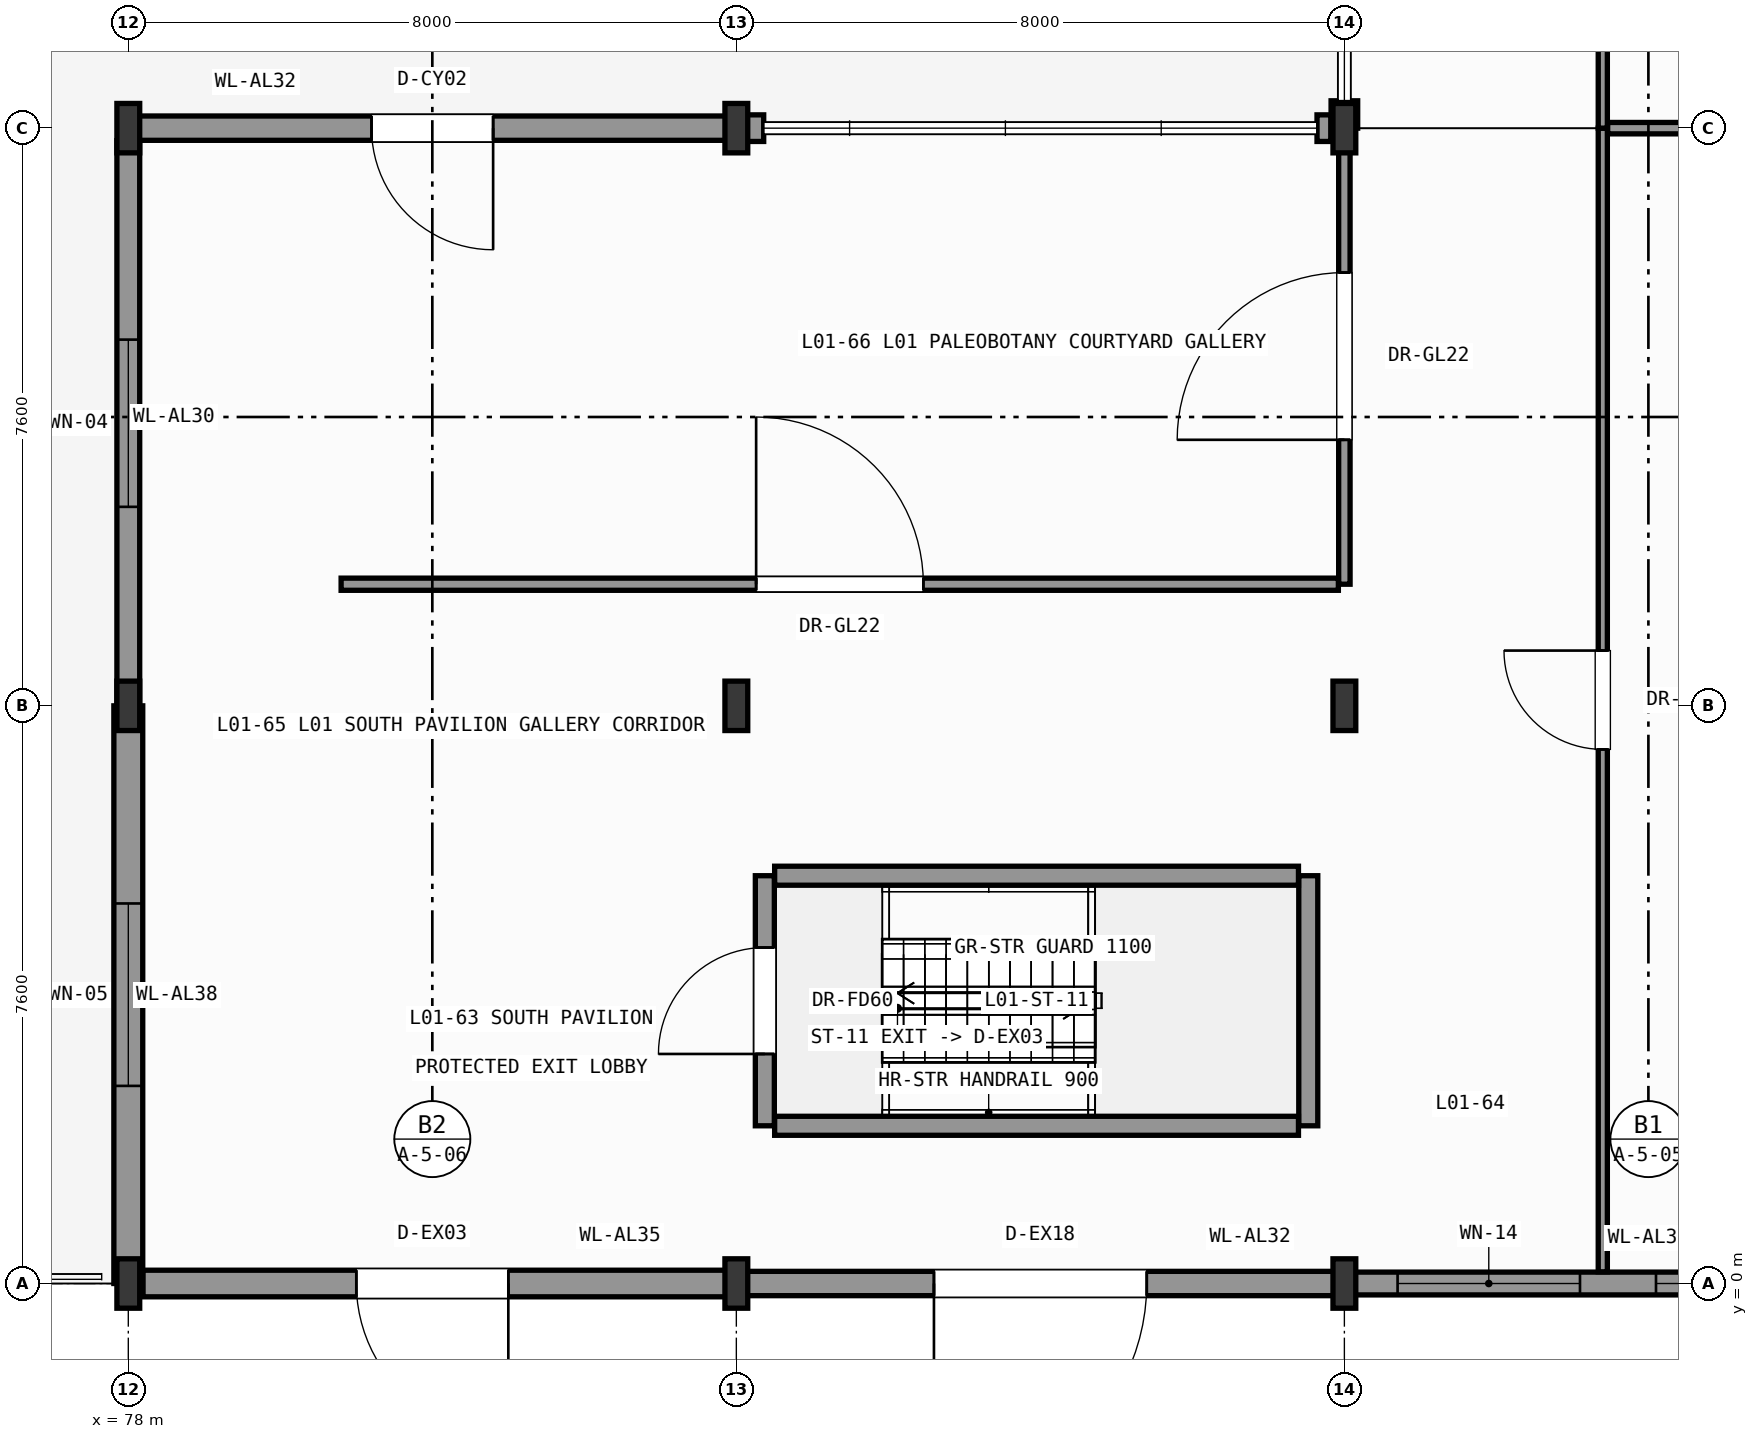
"""IFC4 building model, lengths in metres.
Left out: names, types, materials, properties, quantities, classifications, styles, units other than length and angle.
Written with IfcOpenShell. Run it as: python <this file> out.ifc"""

import sys

from ifc_helpers import new_model, si_unit, direction, frame, frame_2d, origin, origin_2d, place, context, subcontext, project, spatial, rectangle, i_section, extrude, element, fill, save


model = new_model("IFC4")
c1 = context("Model", 3, precision=1e-05, world=origin(), true_north=direction((0.0, 1.0)))
c2 = subcontext(c1, "Body", "Model", "MODEL_VIEW")
j1 = project(units=[si_unit("LENGTHUNIT", "METRE"), si_unit("PLANEANGLEUNIT", "RADIAN")], contexts=[c1])
p1 = place(None, origin())
s1 = spatial("IfcSite", under=j1, at=p1, CompositionType="ELEMENT")
p2 = place(p1, origin())
s2 = spatial("IfcBuilding", under=s1, at=p2, CompositionType="ELEMENT")
p3 = place(p2, origin())
s3 = spatial("IfcBuildingStorey", under=s2, at=p3, CompositionType="ELEMENT", Elevation=0.0)
for number, where, z_axis, x_axis in (
    (1, (78.0, 0.0, 0.0), (0.0, 0.0, 1.0), (1.0, 0.0, 0.0)),
    (2, (78.0, 7.6, 0.0), (0.0, 0.0, 1.0), (1.0, 0.0, 0.0)),
    (3, (78.0, 15.2, 0.0), (0.0, 0.0, 1.0), (1.0, 0.0, 0.0)),
    (4, (86.0, 0.0, 0.0), (0.0, 0.0, 1.0), (1.0, 0.0, 0.0)),
    (5, (86.0, 7.6, 0.0), (0.0, 0.0, 1.0), (1.0, 0.0, 0.0)),
    (6, (86.0, 15.2, 0.0), (0.0, 0.0, 1.0), (1.0, 0.0, 0.0)),
    (7, (94.0, 0.0, 0.0), (0.0, 0.0, 1.0), (1.0, 0.0, 0.0)),
    (8, (94.0, 7.6, 0.0), (0.0, 0.0, 1.0), (1.0, 0.0, 0.0)),
    (9, (94.0, 15.2, 0.0), (0.0, 0.0, 1.0), (1.0, 0.0, 0.0)),
):
    element("IfcColumn", number, at=place(p3, frame(where, z_axis=z_axis, x_axis=x_axis)), inside=s3, PredefinedType="COLUMN", context=c2, shape_type="SweptSolid", body=[
        extrude(i_section(OverallWidth=0.3, OverallDepth=0.65, WebThickness=0.016, FlangeThickness=0.031, FilletRadius=0.027, at=origin_2d()), origin(), (0.0, 0.0, 1.0), 7.8),
    ])
p4 = place(p3, frame((94.0, 15.56, 0.0), z_axis=(0.0, 0.0, 1.0), x_axis=(0.0, -1.0, 0.0)))
e10 = element("IfcWall", 10, at=p4, inside=s3, PredefinedType="SOLIDWALL", context=c2, shape_type="SweptSolid", body=[
    extrude(rectangle(XDim=0.36, YDim=0.35, at=frame_2d((0.18, 0.0))), origin(), (0.0, 0.0, 1.0), 7.025),
])
p5 = place(p3, frame((93.821, 15.2, 0.0), z_axis=(0.0, 0.0, 1.0), x_axis=(-1.0, 0.0, 0.0)))
e11 = element("IfcWall", 11, at=p5, inside=s3, PredefinedType="SOLIDWALL", context=c2, shape_type="SweptSolid", body=[
    extrude(rectangle(XDim=0.181, YDim=0.35, at=frame_2d((0.091, 0.0))), origin(), (0.0, 0.0, 1.0), 7.54),
])
p6 = place(p3, frame((86.36, 15.2, 0.0), z_axis=(0.0, 0.0, 1.0), x_axis=(-1.0, 0.0, 0.0)))
e12 = element("IfcWall", 12, at=p6, inside=s3, PredefinedType="SOLIDWALL", context=c2, shape_type="SweptSolid", body=[
    extrude(rectangle(XDim=0.36, YDim=0.35, at=frame_2d((0.18, 0.0))), origin(), (0.0, 0.0, 1.0), 7.125),
])
p7 = place(p3, frame((78.0, 15.2, 0.0), z_axis=(0.0, 0.0, 1.0), x_axis=(1.0, 0.0, 0.0)))
e13 = element("IfcWall", 13, at=p7, inside=s3, PredefinedType="SOLIDWALL", context=c2, shape_type="SweptSolid", body=[
    extrude(rectangle(XDim=8.0, YDim=0.32, at=frame_2d((4.0, 0.0))), origin(), (0.0, 0.0, 1.0), 7.125),
])
p8 = place(p7, frame((3.2, 0.0, 0.0)))
e14 = element("IfcOpeningElement", 14, at=p8, cuts=e13, PredefinedType="OPENING", context=c2, shape_type="SweptSolid", body=[
    extrude(rectangle(XDim=1.6, YDim=2.4, at=frame_2d((0.8, 1.2))), frame((0.0, 0.17, 0.0), z_axis=(0.0, -1.0, 0.0), x_axis=(1.0, 0.0, 0.0)), (0.0, 0.0, 1.0), 0.34),
])
p9 = place(p3, frame((78.0, 7.6, 0.0), z_axis=(0.0, 0.0, 1.0), x_axis=(0.0, 1.0, 0.0)))
e15 = element("IfcWall", 15, at=p9, inside=s3, PredefinedType="SOLIDWALL", context=c2, shape_type="SweptSolid", body=[
    extrude(rectangle(XDim=7.436, YDim=0.3, at=frame_2d((3.718, 0.0))), origin(), (0.0, 0.0, 1.0), 7.025),
])
p10 = place(p9, frame((2.618, 0.0, 0.95)))
e16 = element("IfcOpeningElement", 16, at=p10, cuts=e15, PredefinedType="OPENING", context=c2, shape_type="SweptSolid", body=[
    extrude(rectangle(XDim=2.2, YDim=4.2, at=frame_2d((1.1, 2.1))), frame((0.0, 0.16, 0.0), z_axis=(0.0, -1.0, 0.0), x_axis=(1.0, 0.0, 0.0)), (0.0, 0.0, 1.0), 0.32),
])
p11 = place(p3, frame((78.0, 0.0, 0.0), z_axis=(0.0, 0.0, 1.0), x_axis=(0.0, 1.0, 0.0)))
e17 = element("IfcWall", 17, at=p11, inside=s3, PredefinedType="SOLIDWALL", context=c2, shape_type="SweptSolid", body=[
    extrude(rectangle(XDim=7.6, YDim=0.38, at=frame_2d((3.8, 0.0))), origin(), (0.0, 0.0, 1.0), 7.025),
])
p12 = place(p11, frame((2.6, 0.0, 0.95)))
e18 = element("IfcOpeningElement", 18, at=p12, cuts=e17, PredefinedType="OPENING", context=c2, shape_type="SweptSolid", body=[
    extrude(rectangle(XDim=2.4, YDim=4.6, at=frame_2d((1.2, 2.3))), frame((0.0, 0.2, 0.0), z_axis=(0.0, -1.0, 0.0), x_axis=(1.0, 0.0, 0.0)), (0.0, 0.0, 1.0), 0.4),
])
p13 = place(p3, frame((86.0, 0.0, 0.0), z_axis=(0.0, 0.0, 1.0), x_axis=(-1.0, 0.0, 0.0)))
e19 = element("IfcWall", 19, at=p13, inside=s3, PredefinedType="SOLIDWALL", context=c2, shape_type="SweptSolid", body=[
    extrude(rectangle(XDim=7.806, YDim=0.35, at=frame_2d((3.903, 0.0))), origin(), (0.0, 0.0, 1.0), 7.135),
])
p14 = place(p13, frame((3.0, 0.0, 0.0)))
e20 = element("IfcOpeningElement", 20, at=p14, cuts=e19, PredefinedType="OPENING", context=c2, shape_type="SweptSolid", body=[
    extrude(rectangle(XDim=2.0, YDim=2.6, at=frame_2d((1.0, 1.3))), frame((0.0, 0.185, 0.0), z_axis=(0.0, -1.0, 0.0), x_axis=(1.0, 0.0, 0.0)), (0.0, 0.0, 1.0), 0.37),
])
p15 = place(p3, frame((94.0, 0.0, 0.0), z_axis=(0.0, 0.0, 1.0), x_axis=(-1.0, 0.0, 0.0)))
e21 = element("IfcWall", 21, at=p15, inside=s3, PredefinedType="SOLIDWALL", context=c2, shape_type="SweptSolid", body=[
    extrude(rectangle(XDim=8.0, YDim=0.32, at=frame_2d((4.0, 0.0))), origin(), (0.0, 0.0, 1.0), 7.135),
])
p16 = place(p15, frame((2.6, 0.0, 0.0)))
e22 = element("IfcOpeningElement", 22, at=p16, cuts=e21, PredefinedType="OPENING", context=c2, shape_type="SweptSolid", body=[
    extrude(rectangle(XDim=2.8, YDim=3.0, at=frame_2d((1.4, 1.5))), frame((0.0, 0.17, 0.0), z_axis=(0.0, -1.0, 0.0), x_axis=(1.0, 0.0, 0.0)), (0.0, 0.0, 1.0), 0.34),
])
p17 = place(p3, frame((102.0, 0.0, 0.0), z_axis=(0.0, 0.0, 1.0), x_axis=(-1.0, 0.0, 0.0)))
e23 = element("IfcWall", 23, at=p17, inside=s3, PredefinedType="SOLIDWALL", context=c2, shape_type="SweptSolid", body=[
    extrude(rectangle(XDim=8.0, YDim=0.3, at=frame_2d((4.0, 0.0))), origin(), (0.0, 0.0, 1.0), 7.135),
])
p18 = place(p17, frame((1.5, 0.0, 0.95)))
e24 = element("IfcOpeningElement", 24, at=p18, cuts=e23, PredefinedType="OPENING", context=c2, shape_type="SweptSolid", body=[
    extrude(rectangle(XDim=2.4, YDim=3.0, at=frame_2d((1.2, 1.5))), frame((0.0, 0.16, 0.0), z_axis=(0.0, -1.0, 0.0), x_axis=(1.0, 0.0, 0.0)), (0.0, 0.0, 1.0), 0.32),
])
p19 = place(p17, frame((4.9, 0.0, 0.95)))
e25 = element("IfcOpeningElement", 25, at=p19, cuts=e23, PredefinedType="OPENING", context=c2, shape_type="SweptSolid", body=[
    extrude(rectangle(XDim=2.4, YDim=3.0, at=frame_2d((1.2, 1.5))), frame((0.0, 0.16, 0.0), z_axis=(0.0, -1.0, 0.0), x_axis=(1.0, 0.0, 0.0)), (0.0, 0.0, 1.0), 0.32),
])
p20 = place(p3, frame((86.375, 2.075, 0.0), z_axis=(0.0, 0.0, 1.0), x_axis=(0.0, 1.0, 0.0)))
e26 = element("IfcWall", 26, at=p20, inside=s3, PredefinedType="SHEAR", context=c2, shape_type="SweptSolid", body=[
    extrude(rectangle(XDim=3.29, YDim=0.25, at=frame_2d((1.645, 0.0))), origin(), (0.0, 0.0, 1.0), 7.54),
])
p21 = place(p20, frame((0.945, 0.0, 0.0)))
e27 = element("IfcOpeningElement", 27, at=p21, cuts=e26, PredefinedType="OPENING", context=c2, shape_type="SweptSolid", body=[
    extrude(rectangle(XDim=1.4, YDim=2.2, at=frame_2d((0.7, 1.1))), frame((0.0, 0.135, 0.0), z_axis=(0.0, -1.0, 0.0), x_axis=(1.0, 0.0, 0.0)), (0.0, 0.0, 1.0), 0.27),
])
p22 = place(p3, frame((93.525, 2.075, 0.0), z_axis=(0.0, 0.0, 1.0), x_axis=(0.0, 1.0, 0.0)))
e28 = element("IfcWall", 28, at=p22, inside=s3, PredefinedType="SHEAR", context=c2, shape_type="SweptSolid", body=[
    extrude(rectangle(XDim=3.29, YDim=0.25, at=frame_2d((1.645, 0.0))), origin(), (0.0, 0.0, 1.0), 7.54),
])
for number, where, z_axis, x_axis in (
    (29, (86.504, 2.075, 0.0), (0.0, 0.0, 1.0), (1.0, 0.0, 0.0)),
    (30, (86.504, 5.365, 0.0), (0.0, 0.0, 1.0), (1.0, 0.0, 0.0)),
):
    element("IfcWall", number, at=place(p3, frame(where, z_axis=z_axis, x_axis=x_axis)), inside=s3, PredefinedType="SHEAR", context=c2, shape_type="SweptSolid", body=[
        extrude(rectangle(XDim=6.892, YDim=0.25, at=frame_2d((3.446, 0.0))), origin(), (0.0, 0.0, 1.0), 7.54),
    ])
p23 = place(p3, frame((94.0, 9.2, 0.0), z_axis=(0.0, 0.0, 1.0), x_axis=(0.0, 1.0, 0.0)))
e31 = element("IfcWall", 31, at=p23, inside=s3, PredefinedType="PARTITIONING", context=c2, shape_type="SweptSolid", body=[
    extrude(rectangle(XDim=6.0, YDim=0.15, at=frame_2d((3.0, 0.0))), origin(), (0.0, 0.0, 1.0), 7.025),
])
p24 = place(p23, frame((1.9, 0.0, 0.0)))
e32 = element("IfcOpeningElement", 32, at=p24, cuts=e31, PredefinedType="OPENING", context=c2, shape_type="SweptSolid", body=[
    extrude(rectangle(XDim=2.2, YDim=2.6, at=frame_2d((1.1, 1.3))), frame((0.0, 0.085, 0.0), z_axis=(0.0, -1.0, 0.0), x_axis=(1.0, 0.0, 0.0)), (0.0, 0.0, 1.0), 0.17),
])
p25 = place(p3, frame((97.4, 0.154, 0.0), z_axis=(0.0, 0.0, 1.0), x_axis=(0.0, 1.0, 0.0)))
e33 = element("IfcWall", 33, at=p25, inside=s3, PredefinedType="PARTITIONING", context=c2, shape_type="SweptSolid", body=[
    extrude(rectangle(XDim=15.046, YDim=0.12, at=frame_2d((7.523, 0.0))), origin(), (0.0, 0.0, 1.0), 7.54),
])
p26 = place(p25, frame((6.873, 0.0, 0.0)))
e34 = element("IfcOpeningElement", 34, at=p26, cuts=e33, PredefinedType="OPENING", context=c2, shape_type="SweptSolid", body=[
    extrude(rectangle(XDim=1.3, YDim=2.25, at=frame_2d((0.65, 1.125))), frame((0.0, 0.07, 0.0), z_axis=(0.0, -1.0, 0.0), x_axis=(1.0, 0.0, 0.0)), (0.0, 0.0, 1.0), 0.14),
])
p27 = place(p3, frame((80.8, 9.2, 0.0), z_axis=(0.0, 0.0, 1.0), x_axis=(1.0, 0.0, 0.0)))
e35 = element("IfcWall", 35, at=p27, inside=s3, PredefinedType="PARTITIONING", context=c2, shape_type="SweptSolid", body=[
    extrude(rectangle(XDim=13.121, YDim=0.16, at=frame_2d((6.561, 0.0))), origin(), (0.0, 0.0, 1.0), 7.54),
])
p28 = place(p27, frame((5.46, 0.0, 0.0)))
e36 = element("IfcOpeningElement", 36, at=p28, cuts=e35, PredefinedType="OPENING", context=c2, shape_type="SweptSolid", body=[
    extrude(rectangle(XDim=2.2, YDim=2.6, at=frame_2d((1.1, 1.3))), frame((0.0, 0.09, 0.0), z_axis=(0.0, -1.0, 0.0), x_axis=(1.0, 0.0, 0.0)), (0.0, 0.0, 1.0), 0.18),
])
p29 = place(p3, frame((97.464, 15.2, 0.0), z_axis=(0.0, 0.0, 1.0), x_axis=(1.0, 0.0, 0.0)))
e37 = element("IfcWall", 37, at=p29, inside=s3, PredefinedType="PARTITIONING", context=c2, shape_type="SweptSolid", body=[
    extrude(rectangle(XDim=4.536, YDim=0.15, at=frame_2d((2.268, 0.0))), origin(), (0.0, 0.0, 1.0), 7.025),
])
p30 = place(p3, frame((97.4, 15.2, 0.0), z_axis=(0.0, 0.0, 1.0), x_axis=(0.0, 1.0, 0.0)))
e38 = element("IfcWall", 38, at=p30, inside=s3, PredefinedType="PARTITIONING", context=c2, shape_type="SweptSolid", body=[
    extrude(rectangle(XDim=30.4, YDim=0.12, at=frame_2d((15.2, 0.0))), origin(), (0.0, 0.0, 1.0), 7.54),
])
p31 = place(p30, frame((14.1, 0.0, 0.0)))
e39 = element("IfcOpeningElement", 39, at=p31, cuts=e38, PredefinedType="OPENING", context=c2, shape_type="SweptSolid", body=[
    extrude(rectangle(XDim=2.2, YDim=2.6, at=frame_2d((1.1, 1.3))), frame((0.0, 0.07, 0.0), z_axis=(0.0, -1.0, 0.0), x_axis=(1.0, 0.0, 0.0)), (0.0, 0.0, 1.0), 0.14),
])
p32 = place(p8, origin())
e40 = element("IfcDoor", 40, at=p32, inside=s3, OperationType="SINGLE_SWING_RIGHT", PredefinedType="DOOR", context=c2, shape_type="SweptSolid", body=[
    extrude(rectangle(XDim=1.6, YDim=2.4, at=frame_2d((0.8, 1.2))), frame((0.0, 0.025, 0.0), z_axis=(0.0, -1.0, 0.0), x_axis=(1.0, 0.0, 0.0)), (0.0, 0.0, 1.0), 0.05),
])
fill(e14, e40)
p33 = place(p10, origin())
e41 = element("IfcWindow", 41, at=p33, inside=s3, PartitioningType="SINGLE_PANEL", PredefinedType="WINDOW", context=c2, shape_type="SweptSolid", body=[
    extrude(rectangle(XDim=2.2, YDim=4.2, at=frame_2d((1.1, 2.1))), frame((0.0, 0.03, 0.0), z_axis=(0.0, -1.0, 0.0), x_axis=(1.0, 0.0, 0.0)), (0.0, 0.0, 1.0), 0.06),
])
fill(e16, e41)
p34 = place(p12, origin())
e42 = element("IfcWindow", 42, at=p34, inside=s3, PartitioningType="SINGLE_PANEL", PredefinedType="WINDOW", context=c2, shape_type="SweptSolid", body=[
    extrude(rectangle(XDim=2.4, YDim=4.6, at=frame_2d((1.2, 2.3))), frame((0.0, 0.03, 0.0), z_axis=(0.0, -1.0, 0.0), x_axis=(1.0, 0.0, 0.0)), (0.0, 0.0, 1.0), 0.06),
])
fill(e18, e42)
p35 = place(p14, origin())
e43 = element("IfcDoor", 43, at=p35, inside=s3, OperationType="SINGLE_SWING_LEFT", PredefinedType="DOOR", context=c2, shape_type="SweptSolid", body=[
    extrude(rectangle(XDim=2.0, YDim=2.6, at=frame_2d((1.0, 1.3))), frame((0.0, 0.025, 0.0), z_axis=(0.0, -1.0, 0.0), x_axis=(1.0, 0.0, 0.0)), (0.0, 0.0, 1.0), 0.05),
])
fill(e20, e43)
p36 = place(p16, origin())
e44 = element("IfcDoor", 44, at=p36, inside=s3, OperationType="SINGLE_SWING_RIGHT", PredefinedType="DOOR", context=c2, shape_type="SweptSolid", body=[
    extrude(rectangle(XDim=2.8, YDim=3.0, at=frame_2d((1.4, 1.5))), frame((0.0, 0.025, 0.0), z_axis=(0.0, -1.0, 0.0), x_axis=(1.0, 0.0, 0.0)), (0.0, 0.0, 1.0), 0.05),
])
fill(e22, e44)
p37 = place(p18, origin())
e45 = element("IfcWindow", 45, at=p37, inside=s3, PartitioningType="SINGLE_PANEL", PredefinedType="WINDOW", context=c2, shape_type="SweptSolid", body=[
    extrude(rectangle(XDim=2.4, YDim=3.0, at=frame_2d((1.2, 1.5))), frame((0.0, 0.03, 0.0), z_axis=(0.0, -1.0, 0.0), x_axis=(1.0, 0.0, 0.0)), (0.0, 0.0, 1.0), 0.06),
])
fill(e24, e45)
p38 = place(p19, origin())
e46 = element("IfcWindow", 46, at=p38, inside=s3, PartitioningType="SINGLE_PANEL", PredefinedType="WINDOW", context=c2, shape_type="SweptSolid", body=[
    extrude(rectangle(XDim=2.4, YDim=3.0, at=frame_2d((1.2, 1.5))), frame((0.0, 0.03, 0.0), z_axis=(0.0, -1.0, 0.0), x_axis=(1.0, 0.0, 0.0)), (0.0, 0.0, 1.0), 0.06),
])
fill(e25, e46)
p39 = place(p21, origin())
e47 = element("IfcDoor", 47, at=p39, inside=s3, OperationType="SINGLE_SWING_LEFT", PredefinedType="DOOR", context=c2, shape_type="SweptSolid", body=[
    extrude(rectangle(XDim=1.4, YDim=2.2, at=frame_2d((0.7, 1.1))), frame((0.0, 0.025, 0.0), z_axis=(0.0, -1.0, 0.0), x_axis=(1.0, 0.0, 0.0)), (0.0, 0.0, 1.0), 0.05),
])
fill(e27, e47)
p40 = place(p24, origin())
e48 = element("IfcDoor", 48, at=p40, inside=s3, OperationType="SINGLE_SWING_LEFT", PredefinedType="DOOR", context=c2, shape_type="SweptSolid", body=[
    extrude(rectangle(XDim=2.2, YDim=2.6, at=frame_2d((1.1, 1.3))), frame((0.0, 0.025, 0.0), z_axis=(0.0, -1.0, 0.0), x_axis=(1.0, 0.0, 0.0)), (0.0, 0.0, 1.0), 0.05),
])
fill(e32, e48)
p41 = place(p26, origin())
e49 = element("IfcDoor", 49, at=p41, inside=s3, OperationType="SINGLE_SWING_RIGHT", PredefinedType="DOOR", context=c2, shape_type="SweptSolid", body=[
    extrude(rectangle(XDim=1.3, YDim=2.25, at=frame_2d((0.65, 1.125))), frame((0.0, 0.025, 0.0), z_axis=(0.0, -1.0, 0.0), x_axis=(1.0, 0.0, 0.0)), (0.0, 0.0, 1.0), 0.05),
])
fill(e34, e49)
p42 = place(p28, origin())
e50 = element("IfcDoor", 50, at=p42, inside=s3, OperationType="SINGLE_SWING_LEFT", PredefinedType="DOOR", context=c2, shape_type="SweptSolid", body=[
    extrude(rectangle(XDim=2.2, YDim=2.6, at=frame_2d((1.1, 1.3))), frame((0.0, 0.025, 0.0), z_axis=(0.0, -1.0, 0.0), x_axis=(1.0, 0.0, 0.0)), (0.0, 0.0, 1.0), 0.05),
])
fill(e36, e50)
save(model, sys.argv[1])
